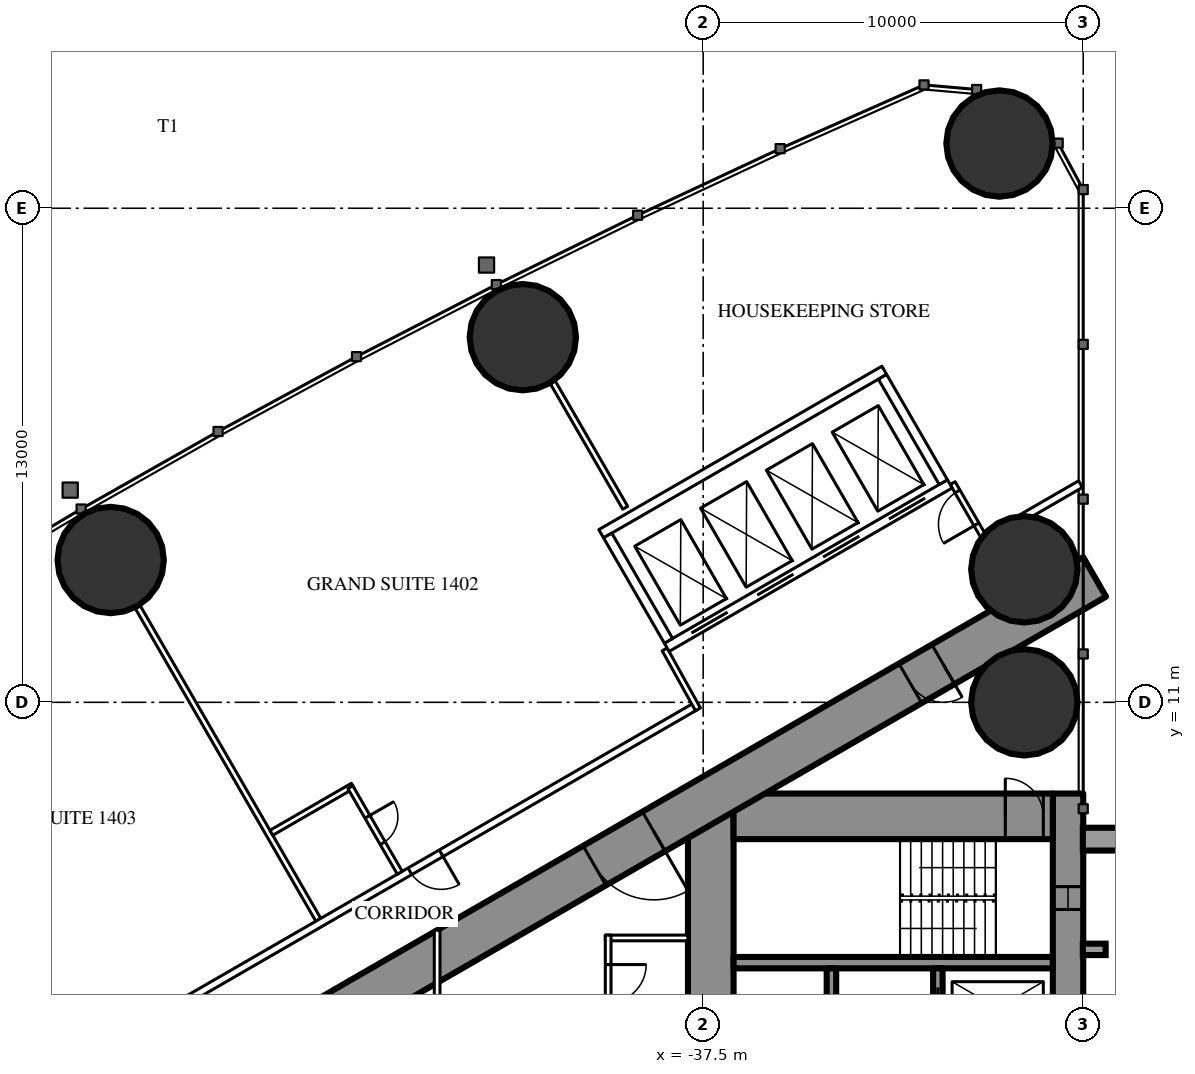
"""IFC4 building model, lengths in metres.
Left out: names, types, materials, properties, quantities, classifications, styles, units other than length and angle.
Written with IfcOpenShell. Run it as: python <this file> out.ifc"""

import sys

from ifc_helpers import new_model, si_unit, direction, frame, frame_2d, origin, origin_2d, place, context, subcontext, project, spatial, rectangle, hollow_circle, extrude, element, fill, save


model = new_model("IFC4")
c1 = context("Model", 3, precision=1e-05, world=origin(), true_north=direction((0.0, 1.0)))
c2 = subcontext(c1, "Body", "Model", "MODEL_VIEW")
j1 = project(units=[si_unit("LENGTHUNIT", "METRE"), si_unit("PLANEANGLEUNIT", "RADIAN")], contexts=[c1])
p1 = place(None, origin())
s1 = spatial("IfcSite", under=j1, at=p1, CompositionType="ELEMENT")
p2 = place(p1, origin())
s2 = spatial("IfcBuilding", under=s1, at=p2, CompositionType="ELEMENT")
p3 = place(p2, frame((0.0, 0.0, 56.5)))
s3 = spatial("IfcBuildingStorey", under=s2, at=p3, CompositionType="ELEMENT", Elevation=56.5)
for number, where, z_axis, x_axis in (
    (1, (-29.703, 25.703, 0.0), (0.0, 0.0, 1.0), (1.0, 0.0, 0.0)),
    (2, (-29.05, 11.0, 0.0), (0.0, 0.0, 1.0), (1.0, 0.0, 0.0)),
    (3, (-29.05, 14.5, 0.0), (0.0, 0.0, 1.0), (1.0, 0.0, 0.0)),
    (4, (-42.245, 20.607, 0.0), (0.0, 0.0, 1.0), (1.0, 0.0, 0.0)),
    (5, (-53.09, 14.745, 0.0), (0.0, 0.0, 1.0), (1.0, 0.0, 0.0)),
):
    element("IfcColumn", number, at=place(p3, frame(where, z_axis=z_axis, x_axis=x_axis)), inside=s3, PredefinedType="COLUMN", context=c2, shape_type="SweptSolid", body=[
        extrude(hollow_circle(Radius=1.4, WallThickness=0.12, at=origin_2d()), origin(), (0.0, 0.0, 1.0), 3.5),
    ])
p4 = place(p3, frame((-27.9, 8.6, 0.0), z_axis=(0.0, 0.0, 1.0), x_axis=(0.0, -1.0, 0.0)))
e6 = element("IfcWall", 6, at=p4, inside=s3, PredefinedType="SHEAR", context=c2, shape_type="SweptSolid", body=[
    extrude(rectangle(XDim=17.2, YDim=0.8, at=frame_2d((8.6, 0.0))), origin(), (0.0, 0.0, 1.0), 3.5),
])
p5 = place(p4, frame((2.45, 0.0, 0.6)))
e7 = element("IfcOpeningElement", 7, at=p5, cuts=e6, PredefinedType="OPENING", context=c2, shape_type="SweptSolid", body=[
    extrude(rectangle(XDim=0.6, YDim=2.1, at=frame_2d((0.3, 1.05))), frame((0.0, 0.41, 0.0), z_axis=(0.0, -1.0, 0.0), x_axis=(1.0, 0.0, 0.0)), (0.0, 0.0, 1.0), 0.82),
])
p6 = place(p4, frame((14.15, 0.0, 0.6)))
e8 = element("IfcOpeningElement", 8, at=p6, cuts=e6, PredefinedType="OPENING", context=c2, shape_type="SweptSolid", body=[
    extrude(rectangle(XDim=0.6, YDim=2.1, at=frame_2d((0.3, 1.05))), frame((0.0, 0.41, 0.0), z_axis=(0.0, -1.0, 0.0), x_axis=(1.0, 0.0, 0.0)), (0.0, 0.0, 1.0), 0.82),
])
p7 = place(p3, frame((-37.3, 8.6, 0.0), z_axis=(0.0, 0.0, 1.0), x_axis=(0.0, -1.0, 0.0)))
e9 = element("IfcWall", 9, at=p7, inside=s3, PredefinedType="SHEAR", context=c2, shape_type="SweptSolid", body=[
    extrude(rectangle(XDim=17.2, YDim=1.2, at=frame_2d((8.6, 0.0))), origin(), (0.0, 0.0, 1.0), 3.5),
])
p8 = place(p7, frame((7.7, 0.0, 0.0)))
e10 = element("IfcOpeningElement", 10, at=p8, cuts=e9, PredefinedType="OPENING", context=c2, shape_type="SweptSolid", body=[
    extrude(rectangle(XDim=1.8, YDim=2.2, at=frame_2d((0.9, 1.1))), frame((0.0, 0.61, 0.0), z_axis=(0.0, -1.0, 0.0), x_axis=(1.0, 0.0, 0.0)), (0.0, 0.0, 1.0), 1.22),
])
p9 = place(p3, frame((-28.3, 8.0, 0.0), z_axis=(0.0, 0.0, 1.0), x_axis=(-1.0, 0.0, 0.0)))
e11 = element("IfcWall", 11, at=p9, inside=s3, PredefinedType="SHEAR", context=c2, shape_type="SweptSolid", body=[
    extrude(rectangle(XDim=8.4, YDim=1.2, at=frame_2d((4.2, 0.0))), origin(), (0.0, 0.0, 1.0), 3.5),
])
p10 = place(p9, frame((0.25, 0.0, 0.0)))
e12 = element("IfcOpeningElement", 12, at=p10, cuts=e11, PredefinedType="OPENING", context=c2, shape_type="SweptSolid", body=[
    extrude(rectangle(XDim=1.0, YDim=2.2, at=frame_2d((0.5, 1.1))), frame((0.0, 0.61, 0.0), z_axis=(0.0, -1.0, 0.0), x_axis=(1.0, 0.0, 0.0)), (0.0, 0.0, 1.0), 1.22),
])
p11 = place(p3, frame((-28.3, 4.15, 0.0), z_axis=(0.0, 0.0, 1.0), x_axis=(-1.0, 0.0, 0.0)))
e13 = element("IfcWall", 13, at=p11, inside=s3, PredefinedType="SHEAR", context=c2, shape_type="SweptSolid", body=[
    extrude(rectangle(XDim=8.4, YDim=0.3, at=frame_2d((4.2, 0.0))), origin(), (0.0, 0.0, 1.0), 3.5),
])
p12 = place(p3, frame((-31.325, 4.0, 0.0), z_axis=(0.0, 0.0, 1.0), x_axis=(0.0, -1.0, 0.0)))
e14 = element("IfcWall", 14, at=p12, inside=s3, PredefinedType="SHEAR", context=c2, shape_type="SweptSolid", body=[
    extrude(rectangle(XDim=2.1, YDim=0.25, at=frame_2d((1.05, 0.0))), origin(), (0.0, 0.0, 1.0), 3.5),
])
p13 = place(p12, frame((0.5, 0.0, 0.0)))
e15 = element("IfcOpeningElement", 15, at=p13, cuts=e14, PredefinedType="OPENING", context=c2, shape_type="SweptSolid", body=[
    extrude(rectangle(XDim=1.1, YDim=2.2, at=frame_2d((0.55, 1.1))), frame((0.0, 0.135, 0.0), z_axis=(0.0, -1.0, 0.0), x_axis=(1.0, 0.0, 0.0)), (0.0, 0.0, 1.0), 0.27),
])
p14 = place(p3, frame((-34.125, 4.0, 0.0), z_axis=(0.0, 0.0, 1.0), x_axis=(0.0, -1.0, 0.0)))
e16 = element("IfcWall", 16, at=p14, inside=s3, PredefinedType="SHEAR", context=c2, shape_type="SweptSolid", body=[
    extrude(rectangle(XDim=2.35, YDim=0.25, at=frame_2d((1.175, 0.0))), origin(), (0.0, 0.0, 1.0), 3.5),
])
p15 = place(p3, frame((-27.2, 14.3, 0.0), z_axis=(0.0, 0.0, 1.0), x_axis=(-0.866026593062, -0.499997940104, 0.0)))
e17 = element("IfcWall", 17, at=p15, inside=s3, PredefinedType="SHEAR", context=c2, shape_type="SweptSolid", body=[
    extrude(rectangle(XDim=28.946, YDim=1.2, at=frame_2d((14.473, 0.0))), origin(), (0.0, 0.0, 1.0), 3.5),
])
p16 = place(p15, frame((4.6, 0.0, 0.0)))
e18 = element("IfcOpeningElement", 18, at=p16, cuts=e17, PredefinedType="OPENING", context=c2, shape_type="SweptSolid", body=[
    extrude(rectangle(XDim=1.0, YDim=2.2, at=frame_2d((0.5, 1.1))), frame((0.0, 0.61, 0.0), z_axis=(0.0, -1.0, 0.0), x_axis=(1.0, 0.0, 0.0)), (0.0, 0.0, 1.0), 1.22),
])
p17 = place(p15, frame((13.395, 0.0, 0.0)))
e19 = element("IfcOpeningElement", 19, at=p17, cuts=e17, PredefinedType="OPENING", context=c2, shape_type="SweptSolid", body=[
    extrude(rectangle(XDim=1.8, YDim=2.2, at=frame_2d((0.9, 1.1))), frame((0.0, 0.61, 0.0), z_axis=(0.0, -1.0, 0.0), x_axis=(1.0, 0.0, 0.0)), (0.0, 0.0, 1.0), 1.22),
])
p18 = place(p3, frame((-47.627, 5.278, 0.0), z_axis=(0.0, 0.0, 1.0), x_axis=(-0.500009844318, 0.86601972009, 0.0)))
e20 = element("IfcWall", 20, at=p18, inside=s3, PredefinedType="PARTITIONING", context=c2, shape_type="SweptSolid", body=[
    extrude(rectangle(XDim=9.51, YDim=0.15, at=frame_2d((4.755, 0.0))), origin(), (0.0, 0.0, 1.0), 2.25),
])
p19 = place(p3, frame((-39.551, 16.119, 0.0), z_axis=(0.0, 0.0, 1.0), x_axis=(-0.500014214979, 0.866017196607, 0.0)))
e21 = element("IfcWall", 21, at=p19, inside=s3, PredefinedType="PARTITIONING", context=c2, shape_type="SweptSolid", body=[
    extrude(rectangle(XDim=3.815, YDim=0.15, at=frame_2d((1.907, 0.0))), origin(), (0.0, 0.0, 1.0), 3.25),
])
p20 = place(p3, frame((-27.572, 16.741, 0.0), z_axis=(0.0, 0.0, 1.0), x_axis=(-0.866034618596, -0.499984039138, 0.0)))
e22 = element("IfcWall", 22, at=p20, inside=s3, PredefinedType="PARTITIONING", context=c2, shape_type="SweptSolid", body=[
    extrude(rectangle(XDim=2.854, YDim=0.2, at=frame_2d((1.427, 0.0))), origin(), (0.0, 0.0, 1.0), 3.25),
])
p21 = place(p3, frame((-37.7, 10.894, 0.0), z_axis=(0.0, 0.0, 1.0), x_axis=(-0.866027905338, -0.499995667157, 0.0)))
e23 = element("IfcWall", 23, at=p21, inside=s3, PredefinedType="PARTITIONING", context=c2, shape_type="SweptSolid", body=[
    extrude(rectangle(XDim=21.787, YDim=0.2, at=frame_2d((10.894, 0.0))), origin(), (0.0, 0.0, 1.0), 3.25),
])
p22 = place(p21, frame((20.237, 0.0, 0.0)))
e24 = element("IfcOpeningElement", 24, at=p22, cuts=e23, PredefinedType="OPENING", context=c2, shape_type="SweptSolid", body=[
    extrude(rectangle(XDim=0.95, YDim=2.2, at=frame_2d((0.475, 1.1))), frame((0.0, 0.11, 0.0), z_axis=(0.0, -1.0, 0.0), x_axis=(1.0, 0.0, 0.0)), (0.0, 0.0, 1.0), 0.22),
])
p23 = place(p21, frame((7.73, 0.0, 0.0)))
e25 = element("IfcOpeningElement", 25, at=p23, cuts=e23, PredefinedType="OPENING", context=c2, shape_type="SweptSolid", body=[
    extrude(rectangle(XDim=0.95, YDim=2.2, at=frame_2d((0.475, 1.1))), frame((0.0, 0.11, 0.0), z_axis=(0.0, -1.0, 0.0), x_axis=(1.0, 0.0, 0.0)), (0.0, 0.0, 1.0), 0.22),
])
p24 = place(p3, frame((-38.513, 12.392, 0.0), z_axis=(0.0, 0.0, 1.0), x_axis=(0.485585508183, -0.874189175317, 0.0)))
e26 = element("IfcWall", 26, at=p24, inside=s3, PredefinedType="PARTITIONING", context=c2, shape_type="SweptSolid", body=[
    extrude(rectangle(XDim=1.805, YDim=0.15, at=frame_2d((0.902, 0.0))), origin(), (0.0, 0.0, 1.0), 3.25),
])
p25 = place(p3, frame((-30.033, 15.205, 0.0), z_axis=(0.0, 0.0, 1.0), x_axis=(-0.499980071345, 0.866036909293, 0.0)))
e27 = element("IfcWall", 27, at=p25, inside=s3, PredefinedType="PARTITIONING", context=c2, shape_type="SweptSolid", body=[
    extrude(rectangle(XDim=1.805, YDim=0.15, at=frame_2d((0.902, 0.0))), origin(), (0.0, 0.0, 1.0), 3.25),
])
p26 = place(p25, frame((0.552, 0.0, 0.0)))
e28 = element("IfcOpeningElement", 28, at=p26, cuts=e27, PredefinedType="OPENING", context=c2, shape_type="SweptSolid", body=[
    extrude(rectangle(XDim=1.0, YDim=2.2, at=frame_2d((0.5, 1.1))), frame((0.0, 0.085, 0.0), z_axis=(0.0, -1.0, 0.0), x_axis=(1.0, 0.0, 0.0)), (0.0, 0.0, 1.0), 0.17),
])
p27 = place(p3, frame((-46.719, 8.804, 0.0), z_axis=(0.0, 0.0, 1.0), x_axis=(-0.866006523861, -0.500032699561, 0.0)))
e29 = element("IfcWall", 29, at=p27, inside=s3, PredefinedType="PARTITIONING", context=c2, shape_type="SweptSolid", body=[
    extrude(rectangle(XDim=2.475, YDim=0.15, at=frame_2d((1.237, 0.0))), origin(), (0.0, 0.0, 1.0), 3.25),
])
p28 = place(p3, frame((-45.483, 6.515, 0.0), z_axis=(0.0, 0.0, 1.0), x_axis=(-0.500006934395, 0.866021400173, 0.0)))
e30 = element("IfcWall", 30, at=p28, inside=s3, PredefinedType="PARTITIONING", context=c2, shape_type="SweptSolid", body=[
    extrude(rectangle(XDim=2.6, YDim=0.15, at=frame_2d((1.3, 0.0))), origin(), (0.0, 0.0, 1.0), 3.25),
])
p29 = place(p28, frame((0.9, 0.0, 0.0)))
e31 = element("IfcOpeningElement", 31, at=p29, cuts=e30, PredefinedType="OPENING", context=c2, shape_type="SweptSolid", body=[
    extrude(rectangle(XDim=0.8, YDim=2.2, at=frame_2d((0.4, 1.1))), frame((0.0, 0.085, 0.0), z_axis=(0.0, -1.0, 0.0), x_axis=(1.0, 0.0, 0.0)), (0.0, 0.0, 1.0), 0.17),
])
p30 = place(p3, frame((-37.9, 4.8, 0.0), z_axis=(0.0, 0.0, 1.0), x_axis=(-1.0, 0.0, 0.0)))
e32 = element("IfcWall", 32, at=p30, inside=s3, PredefinedType="PARTITIONING", context=c2, shape_type="SweptSolid", body=[
    extrude(rectangle(XDim=2.175, YDim=0.15, at=frame_2d((1.087, 0.0))), origin(), (0.0, 0.0, 1.0), 3.25),
])
p31 = place(p3, frame((-40.0, 4.875, 0.0), z_axis=(0.0, 0.0, 1.0), x_axis=(0.0, -1.0, 0.0)))
e33 = element("IfcWall", 33, at=p31, inside=s3, PredefinedType="PARTITIONING", context=c2, shape_type="SweptSolid", body=[
    extrude(rectangle(XDim=2.55, YDim=0.15, at=frame_2d((1.275, 0.0))), origin(), (0.0, 0.0, 1.0), 3.25),
])
p32 = place(p31, frame((0.775, 0.0, 0.0)))
e34 = element("IfcOpeningElement", 34, at=p32, cuts=e33, PredefinedType="OPENING", context=c2, shape_type="SweptSolid", body=[
    extrude(rectangle(XDim=1.0, YDim=2.2, at=frame_2d((0.5, 1.1))), frame((0.0, 0.085, 0.0), z_axis=(0.0, -1.0, 0.0), x_axis=(1.0, 0.0, 0.0)), (0.0, 0.0, 1.0), 0.17),
])
p33 = place(p3, frame((-44.5, 5.005, 0.0), z_axis=(0.0, 0.0, 1.0), x_axis=(0.0, -1.0, 0.0)))
e35 = element("IfcWall", 35, at=p33, inside=s3, PredefinedType="PARTITIONING", context=c2, shape_type="SweptSolid", body=[
    extrude(rectangle(XDim=10.009, YDim=0.15, at=frame_2d((5.005, 0.0))), origin(), (0.0, 0.0, 1.0), 2.45),
])
p34 = place(p33, frame((4.505, 0.0, 0.0)))
e36 = element("IfcOpeningElement", 36, at=p34, cuts=e35, PredefinedType="OPENING", context=c2, shape_type="SweptSolid", body=[
    extrude(rectangle(XDim=1.0, YDim=2.2, at=frame_2d((0.5, 1.1))), frame((0.0, 0.085, 0.0), z_axis=(0.0, -1.0, 0.0), x_axis=(1.0, 0.0, 0.0)), (0.0, 0.0, 1.0), 0.17),
])
p35 = place(p3, frame((-31.01, 16.747, 0.0), z_axis=(0.0, 0.0, 1.0), x_axis=(-0.866028165386, -0.499995216735, 0.0)))
e37 = element("IfcWall", 37, at=p35, inside=s3, PredefinedType="PARTITIONING", context=c2, shape_type="SweptSolid", body=[
    extrude(rectangle(XDim=8.6, YDim=0.25, at=frame_2d((4.3, 0.0))), origin(), (0.0, 0.0, 1.0), 3.25),
])
p36 = place(p35, frame((0.75, 0.0, 0.0)))
e38 = element("IfcOpeningElement", 38, at=p36, cuts=e37, PredefinedType="OPENING", context=c2, shape_type="SweptSolid", body=[
    extrude(rectangle(XDim=1.1, YDim=2.2, at=frame_2d((0.55, 1.1))), frame((0.0, 0.135, 0.0), z_axis=(0.0, -1.0, 0.0), x_axis=(1.0, 0.0, 0.0)), (0.0, 0.0, 1.0), 0.27),
])
p37 = place(p35, frame((2.75, 0.0, 0.0)))
e39 = element("IfcOpeningElement", 39, at=p37, cuts=e37, PredefinedType="OPENING", context=c2, shape_type="SweptSolid", body=[
    extrude(rectangle(XDim=1.1, YDim=2.2, at=frame_2d((0.55, 1.1))), frame((0.0, 0.135, 0.0), z_axis=(0.0, -1.0, 0.0), x_axis=(1.0, 0.0, 0.0)), (0.0, 0.0, 1.0), 0.27),
])
p38 = place(p35, frame((4.75, 0.0, 0.0)))
e40 = element("IfcOpeningElement", 40, at=p38, cuts=e37, PredefinedType="OPENING", context=c2, shape_type="SweptSolid", body=[
    extrude(rectangle(XDim=1.1, YDim=2.2, at=frame_2d((0.55, 1.1))), frame((0.0, 0.135, 0.0), z_axis=(0.0, -1.0, 0.0), x_axis=(1.0, 0.0, 0.0)), (0.0, 0.0, 1.0), 0.27),
])
p39 = place(p35, frame((6.75, 0.0, 0.0)))
e41 = element("IfcOpeningElement", 41, at=p39, cuts=e37, PredefinedType="OPENING", context=c2, shape_type="SweptSolid", body=[
    extrude(rectangle(XDim=1.1, YDim=2.2, at=frame_2d((0.55, 1.1))), frame((0.0, 0.135, 0.0), z_axis=(0.0, -1.0, 0.0), x_axis=(1.0, 0.0, 0.0)), (0.0, 0.0, 1.0), 0.27),
])
p40 = place(p3, frame((-32.736, 19.736, 0.0), z_axis=(0.0, 0.0, 1.0), x_axis=(-0.866028165386, -0.499995216735, 0.0)))
e42 = element("IfcWall", 42, at=p40, inside=s3, PredefinedType="PARTITIONING", context=c2, shape_type="SweptSolid", body=[
    extrude(rectangle(XDim=8.6, YDim=0.25, at=frame_2d((4.3, 0.0))), origin(), (0.0, 0.0, 1.0), 3.25),
])
p41 = place(p3, frame((-31.181, 16.793, 0.0), z_axis=(0.0, 0.0, 1.0), x_axis=(-0.499929347863, 0.866066190972, 0.0)))
e43 = element("IfcWall", 43, at=p41, inside=s3, PredefinedType="PARTITIONING", context=c2, shape_type="SweptSolid", body=[
    extrude(rectangle(XDim=3.201, YDim=0.25, at=frame_2d((1.6, 0.0))), origin(), (0.0, 0.0, 1.0), 3.25),
])
p42 = place(p3, frame((-38.413, 12.618, 0.0), z_axis=(0.0, 0.0, 1.0), x_axis=(-0.499872130319, 0.866099216793, 0.0)))
e44 = element("IfcWall", 44, at=p42, inside=s3, PredefinedType="PARTITIONING", context=c2, shape_type="SweptSolid", body=[
    extrude(rectangle(XDim=3.2, YDim=0.25, at=frame_2d((1.6, 0.0))), origin(), (0.0, 0.0, 1.0), 3.25),
])
p43 = place(p29, origin())
e45 = element("IfcDoor", 45, at=p43, inside=s3, OperationType="SINGLE_SWING_RIGHT", PredefinedType="DOOR", context=c2, shape_type="SweptSolid", body=[
    extrude(rectangle(XDim=0.8, YDim=2.2, at=frame_2d((0.4, 1.1))), frame((0.0, 0.025, 0.0), z_axis=(0.0, -1.0, 0.0), x_axis=(1.0, 0.0, 0.0)), (0.0, 0.0, 1.0), 0.05),
])
fill(e31, e45)
p44 = place(p23, origin())
e46 = element("IfcDoor", 46, at=p44, inside=s3, OperationType="SINGLE_SWING_LEFT", PredefinedType="DOOR", context=c2, shape_type="SweptSolid", body=[
    extrude(rectangle(XDim=0.95, YDim=2.2, at=frame_2d((0.475, 1.1))), frame((0.0, 0.025, 0.0), z_axis=(0.0, -1.0, 0.0), x_axis=(1.0, 0.0, 0.0)), (0.0, 0.0, 1.0), 0.05),
])
fill(e25, e46)
p45 = place(p26, origin())
e47 = element("IfcDoor", 47, at=p45, inside=s3, OperationType="SINGLE_SWING_LEFT", PredefinedType="DOOR", context=c2, shape_type="SweptSolid", body=[
    extrude(rectangle(XDim=1.0, YDim=2.2, at=frame_2d((0.5, 1.1))), frame((0.0, 0.025, 0.0), z_axis=(0.0, -1.0, 0.0), x_axis=(1.0, 0.0, 0.0)), (0.0, 0.0, 1.0), 0.05),
])
fill(e28, e47)
p46 = place(p32, origin())
e48 = element("IfcDoor", 48, at=p46, inside=s3, OperationType="SINGLE_SWING_LEFT", PredefinedType="DOOR", context=c2, shape_type="SweptSolid", body=[
    extrude(rectangle(XDim=1.0, YDim=2.2, at=frame_2d((0.5, 1.1))), frame((0.0, 0.025, 0.0), z_axis=(0.0, -1.0, 0.0), x_axis=(1.0, 0.0, 0.0)), (0.0, 0.0, 1.0), 0.05),
])
fill(e34, e48)
p47 = place(p16, origin())
e49 = element("IfcDoor", 49, at=p47, inside=s3, OperationType="SINGLE_SWING_LEFT", PredefinedType="DOOR", context=c2, shape_type="SweptSolid", body=[
    extrude(rectangle(XDim=1.0, YDim=2.2, at=frame_2d((0.5, 1.1))), frame((0.0, 0.025, 0.0), z_axis=(0.0, -1.0, 0.0), x_axis=(1.0, 0.0, 0.0)), (0.0, 0.0, 1.0), 0.05),
])
fill(e18, e49)
p48 = place(p17, origin())
e50 = element("IfcDoor", 50, at=p48, inside=s3, OperationType="DOUBLE_DOOR_SINGLE_SWING", PredefinedType="DOOR", context=c2, shape_type="SweptSolid", body=[
    extrude(rectangle(XDim=1.8, YDim=2.2, at=frame_2d((0.9, 1.1))), frame((0.0, 0.025, 0.0), z_axis=(0.0, -1.0, 0.0), x_axis=(1.0, 0.0, 0.0)), (0.0, 0.0, 1.0), 0.05),
])
fill(e19, e50)
p49 = place(p10, origin())
e51 = element("IfcDoor", 51, at=p49, inside=s3, OperationType="SINGLE_SWING_RIGHT", PredefinedType="DOOR", context=c2, shape_type="SweptSolid", body=[
    extrude(rectangle(XDim=1.0, YDim=2.2, at=frame_2d((0.5, 1.1))), frame((0.0, 0.025, 0.0), z_axis=(0.0, -1.0, 0.0), x_axis=(1.0, 0.0, 0.0)), (0.0, 0.0, 1.0), 0.05),
])
fill(e12, e51)
p50 = place(p13, origin())
e52 = element("IfcDoor", 52, at=p50, inside=s3, OperationType="SLIDING_TO_LEFT", PredefinedType="USERDEFINED", context=c2, shape_type="SweptSolid", body=[
    extrude(rectangle(XDim=1.1, YDim=2.2, at=frame_2d((0.55, 1.1))), frame((0.0, 0.025, 0.0), z_axis=(0.0, -1.0, 0.0), x_axis=(1.0, 0.0, 0.0)), (0.0, 0.0, 1.0), 0.05),
])
fill(e15, e52)
p51 = place(p36, origin())
e53 = element("IfcDoor", 53, at=p51, inside=s3, OperationType="DOUBLE_DOOR_SLIDING", PredefinedType="USERDEFINED", context=c2, shape_type="SweptSolid", body=[
    extrude(rectangle(XDim=1.1, YDim=2.2, at=frame_2d((0.55, 1.1))), frame((0.0, 0.025, 0.0), z_axis=(0.0, -1.0, 0.0), x_axis=(1.0, 0.0, 0.0)), (0.0, 0.0, 1.0), 0.05),
])
fill(e38, e53)
p52 = place(p37, origin())
e54 = element("IfcDoor", 54, at=p52, inside=s3, OperationType="DOUBLE_DOOR_SLIDING", PredefinedType="USERDEFINED", context=c2, shape_type="SweptSolid", body=[
    extrude(rectangle(XDim=1.1, YDim=2.2, at=frame_2d((0.55, 1.1))), frame((0.0, 0.025, 0.0), z_axis=(0.0, -1.0, 0.0), x_axis=(1.0, 0.0, 0.0)), (0.0, 0.0, 1.0), 0.05),
])
fill(e39, e54)
p53 = place(p38, origin())
e55 = element("IfcDoor", 55, at=p53, inside=s3, OperationType="DOUBLE_DOOR_SLIDING", PredefinedType="USERDEFINED", context=c2, shape_type="SweptSolid", body=[
    extrude(rectangle(XDim=1.1, YDim=2.2, at=frame_2d((0.55, 1.1))), frame((0.0, 0.025, 0.0), z_axis=(0.0, -1.0, 0.0), x_axis=(1.0, 0.0, 0.0)), (0.0, 0.0, 1.0), 0.05),
])
fill(e40, e55)
p54 = place(p39, origin())
e56 = element("IfcDoor", 56, at=p54, inside=s3, OperationType="DOUBLE_DOOR_SLIDING", PredefinedType="USERDEFINED", context=c2, shape_type="SweptSolid", body=[
    extrude(rectangle(XDim=1.1, YDim=2.2, at=frame_2d((0.55, 1.1))), frame((0.0, 0.025, 0.0), z_axis=(0.0, -1.0, 0.0), x_axis=(1.0, 0.0, 0.0)), (0.0, 0.0, 1.0), 0.05),
])
fill(e41, e56)
p55 = place(p5, origin())
e57 = element("IfcWindow", 57, at=p55, inside=s3, PartitioningType="SINGLE_PANEL", PredefinedType="WINDOW", context=c2, shape_type="SweptSolid", body=[
    extrude(rectangle(XDim=0.6, YDim=2.1, at=frame_2d((0.3, 1.05))), frame((0.0, 0.03, 0.0), z_axis=(0.0, -1.0, 0.0), x_axis=(1.0, 0.0, 0.0)), (0.0, 0.0, 1.0), 0.06),
])
fill(e7, e57)
save(model, sys.argv[1])
